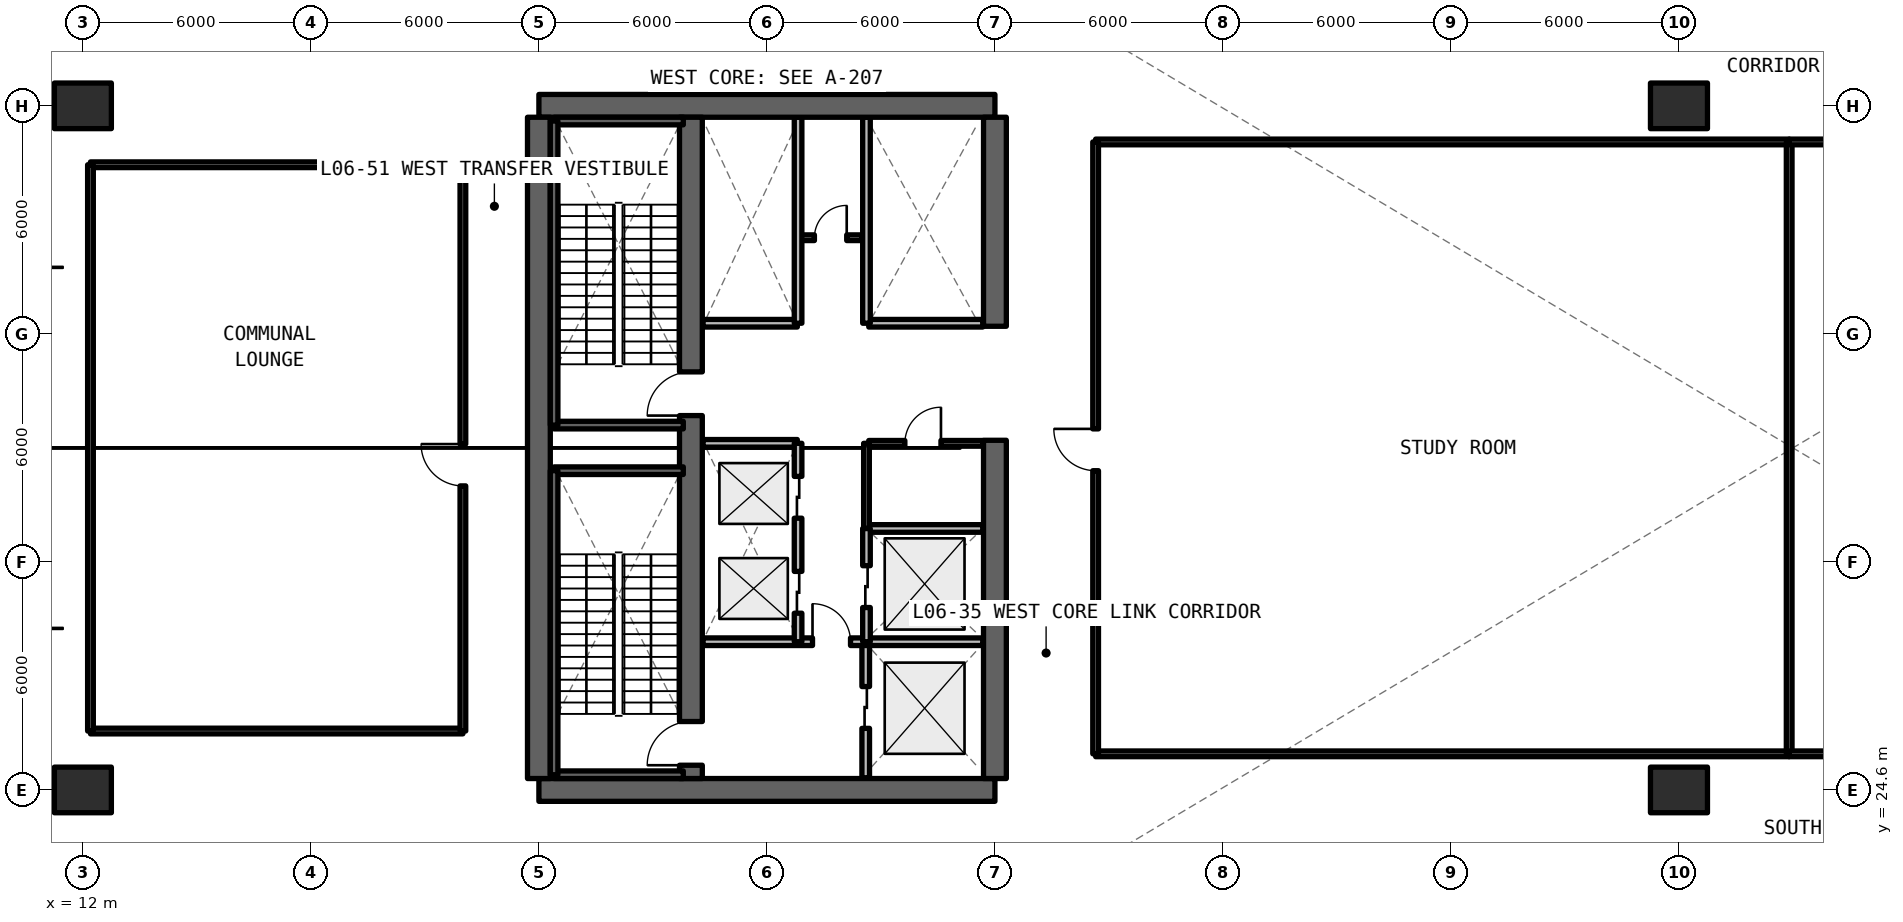
"""IFC4 building model, lengths in metres.
Left out: names, types, materials, properties, quantities, classifications, styles, units other than length and angle.
Written with IfcOpenShell. Run it as: python <this file> out.ifc"""

import sys

from ifc_helpers import new_model, si_unit, direction, frame, frame_2d, origin, origin_2d, place, context, subcontext, project, spatial, rectangle, extrude, element, fill, save


model = new_model("IFC4")
c1 = context("Model", 3, precision=1e-05, world=origin(), true_north=direction((0.0, 1.0)))
c2 = subcontext(c1, "Body", "Model", "MODEL_VIEW")
j1 = project(units=[si_unit("LENGTHUNIT", "METRE"), si_unit("PLANEANGLEUNIT", "RADIAN")], contexts=[c1])
p1 = place(None, origin())
s1 = spatial("IfcSite", under=j1, at=p1, CompositionType="ELEMENT")
p2 = place(p1, origin())
s2 = spatial("IfcBuilding", under=s1, at=p2, CompositionType="ELEMENT")
p3 = place(p2, frame((0.0, 0.0, 24.09)))
s3 = spatial("IfcBuildingStorey", under=s2, at=p3, CompositionType="ELEMENT", Elevation=24.09)
for number, where, z_axis, x_axis in (
    (1, (24.0, 24.6, 0.0), (0.0, 0.0, 1.0), (1.0, 0.0, 0.0)),
    (2, (36.0, 42.6, 0.0), (0.0, 0.0, 1.0), (-1.0, 0.0, 0.0)),
):
    element("IfcWall", number, at=place(p3, frame(where, z_axis=z_axis, x_axis=x_axis)), inside=s3, PredefinedType="SHEAR", context=c2, shape_type="SweptSolid", body=[
        extrude(rectangle(XDim=12.0, YDim=0.6, at=frame_2d((6.0, 0.0))), origin(), (0.0, 0.0, 1.0), 4.95),
    ])
p4 = place(p3, frame((24.0, 24.9, 0.0), z_axis=(0.0, 0.0, 1.0), x_axis=(0.0, 1.0, 0.0)))
e3 = element("IfcWall", 3, at=p4, inside=s3, PredefinedType="SHEAR", context=c2, shape_type="SweptSolid", body=[
    extrude(rectangle(XDim=17.4, YDim=0.6, at=frame_2d((8.7, 0.0))), origin(), (0.0, 0.0, 1.0), 4.95),
])
p5 = place(p3, frame((36.0, 24.9, 0.0), z_axis=(0.0, 0.0, 1.0), x_axis=(0.0, 1.0, 0.0)))
e4 = element("IfcWall", 4, at=p5, inside=s3, PredefinedType="SHEAR", context=c2, shape_type="SweptSolid", body=[
    extrude(rectangle(XDim=8.9, YDim=0.6, at=frame_2d((4.45, 0.0))), origin(), (0.0, 0.0, 1.0), 4.95),
])
p6 = place(p3, frame((36.0, 36.8, 0.0), z_axis=(0.0, 0.0, 1.0), x_axis=(0.0, 1.0, 0.0)))
e5 = element("IfcWall", 5, at=p6, inside=s3, PredefinedType="SHEAR", context=c2, shape_type="SweptSolid", body=[
    extrude(rectangle(XDim=5.5, YDim=0.6, at=frame_2d((2.75, 0.0))), origin(), (0.0, 0.0, 1.0), 4.95),
])
p7 = place(p3, frame((28.0, 24.9, 0.0), z_axis=(0.0, 0.0, 1.0), x_axis=(0.0, 1.0, 0.0)))
e6 = element("IfcWall", 6, at=p7, inside=s3, PredefinedType="SHEAR", context=c2, shape_type="SweptSolid", body=[
    extrude(rectangle(XDim=17.4, YDim=0.6, at=frame_2d((8.7, 0.0))), origin(), (0.0, 0.0, 1.0), 4.95),
])
p8 = place(p7, frame((0.35, 0.0, 0.0)))
e7 = element("IfcOpeningElement", 7, at=p8, cuts=e6, PredefinedType="OPENING", context=c2, shape_type="SweptSolid", body=[
    extrude(rectangle(XDim=1.15, YDim=2.15, at=frame_2d((0.575, 1.075))), frame((0.0, 0.31, 0.0), z_axis=(0.0, -1.0, 0.0), x_axis=(1.0, 0.0, 0.0)), (0.0, 0.0, 1.0), 0.62),
])
p9 = place(p7, frame((9.55, 0.0, 0.0)))
e8 = element("IfcOpeningElement", 8, at=p9, cuts=e6, PredefinedType="OPENING", context=c2, shape_type="SweptSolid", body=[
    extrude(rectangle(XDim=1.15, YDim=2.15, at=frame_2d((0.575, 1.075))), frame((0.0, 0.31, 0.0), z_axis=(0.0, -1.0, 0.0), x_axis=(1.0, 0.0, 0.0)), (0.0, 0.0, 1.0), 0.62),
])
for number, where, z_axis, x_axis in (
    (9, (12.0, 24.6, 0.0), (0.0, 0.0, 1.0), (1.0, 0.0, 0.0)),
    (10, (12.0, 42.6, 0.0), (0.0, 0.0, 1.0), (1.0, 0.0, 0.0)),
):
    element("IfcColumn", number, at=place(p3, frame(where, z_axis=z_axis, x_axis=x_axis)), inside=s3, PredefinedType="COLUMN", context=c2, shape_type="SweptSolid", body=[
        extrude(rectangle(XDim=1.5, YDim=1.2, at=origin_2d()), origin(), (0.0, 0.0, 1.0), 4.71),
    ])
for number, where, z_axis, x_axis in (
    (11, (54.0, 24.6, 0.0), (0.0, 0.0, 1.0), (1.0, 0.0, 0.0)),
    (12, (54.0, 42.6, 0.0), (0.0, 0.0, 1.0), (1.0, 0.0, 0.0)),
):
    element("IfcColumn", number, at=place(p3, frame(where, z_axis=z_axis, x_axis=x_axis)), inside=s3, PredefinedType="COLUMN", context=c2, shape_type="SweptSolid", body=[
        extrude(rectangle(XDim=1.5, YDim=1.2, at=origin_2d()), origin(), (0.0, 0.0, 1.0), 4.95),
    ])
p10 = place(p3, frame((32.6, 24.92, 0.0), z_axis=(0.0, 0.0, 1.0), x_axis=(0.0, 1.0, 0.0)))
e13 = element("IfcWall", 13, at=p10, inside=s3, PredefinedType="SOLIDWALL", context=c2, shape_type="SweptSolid", body=[
    extrude(rectangle(XDim=3.58, YDim=0.2, at=frame_2d((1.79, 0.0))), origin(), (0.0, 0.0, 1.0), 3.93),
])
p11 = place(p10, frame((1.3, 0.0, 0.0)))
e14 = element("IfcOpeningElement", 14, at=p11, cuts=e13, PredefinedType="OPENING", context=c2, shape_type="SweptSolid", body=[
    extrude(rectangle(XDim=1.1, YDim=2.2, at=frame_2d((0.55, 1.1))), frame((0.0, 0.11, 0.0), z_axis=(0.0, -1.0, 0.0), x_axis=(1.0, 0.0, 0.0)), (0.0, 0.0, 1.0), 0.22),
])
p12 = place(p3, frame((28.32, 28.5, 0.0), z_axis=(0.0, 0.0, 1.0), x_axis=(1.0, 0.0, 0.0)))
e15 = element("IfcWall", 15, at=p12, inside=s3, PredefinedType="SOLIDWALL", context=c2, shape_type="SweptSolid", body=[
    extrude(rectangle(XDim=7.36, YDim=0.2, at=frame_2d((3.68, 0.0))), origin(), (0.0, 0.0, 1.0), 3.93),
])
p13 = place(p12, frame((2.88, 0.0, 0.0)))
e16 = element("IfcOpeningElement", 16, at=p13, cuts=e15, PredefinedType="OPENING", context=c2, shape_type="SweptSolid", body=[
    extrude(rectangle(XDim=1.0, YDim=2.15, at=frame_2d((0.5, 1.075))), frame((0.0, 0.11, 0.0), z_axis=(0.0, -1.0, 0.0), x_axis=(1.0, 0.0, 0.0)), (0.0, 0.0, 1.0), 0.22),
])
p14 = place(p3, frame((30.9, 39.13, 0.0), z_axis=(0.0, 0.0, 1.0), x_axis=(1.0, 0.0, 0.0)))
e17 = element("IfcWall", 17, at=p14, inside=s3, PredefinedType="SOLIDWALL", context=c2, shape_type="SweptSolid", body=[
    extrude(rectangle(XDim=1.6, YDim=0.15, at=frame_2d((0.8, 0.0))), origin(), (0.0, 0.0, 1.0), 3.93),
])
p15 = place(p14, frame((0.35, 0.0, 0.0)))
e18 = element("IfcOpeningElement", 18, at=p15, cuts=e17, PredefinedType="OPENING", context=c2, shape_type="SweptSolid", body=[
    extrude(rectangle(XDim=0.85, YDim=2.1, at=frame_2d((0.425, 1.05))), frame((0.0, 0.085, 0.0), z_axis=(0.0, -1.0, 0.0), x_axis=(1.0, 0.0, 0.0)), (0.0, 0.0, 1.0), 0.17),
])
p16 = place(p3, frame((28.32, 33.72, 0.0), z_axis=(0.0, 0.0, 1.0), x_axis=(1.0, 0.0, 0.0)))
e19 = element("IfcWall", 19, at=p16, inside=s3, PredefinedType="SOLIDWALL", context=c2, shape_type="SweptSolid", body=[
    extrude(rectangle(XDim=2.48, YDim=0.2, at=frame_2d((1.24, 0.0))), origin(), (0.0, 0.0, 1.0), 3.93),
])
p17 = place(p3, frame((30.82, 28.5, 0.0), z_axis=(0.0, 0.0, 1.0), x_axis=(0.0, 1.0, 0.0)))
e20 = element("IfcWall", 20, at=p17, inside=s3, PredefinedType="SOLIDWALL", context=c2, shape_type="SweptSolid", body=[
    extrude(rectangle(XDim=5.22, YDim=0.2, at=frame_2d((2.61, 0.0))), origin(), (0.0, 0.0, 1.0), 3.93),
])
p18 = place(p17, frame((0.75, 0.0, 0.0)))
e21 = element("IfcOpeningElement", 21, at=p18, cuts=e20, PredefinedType="OPENING", context=c2, shape_type="SweptSolid", body=[
    extrude(rectangle(XDim=1.1, YDim=2.2, at=frame_2d((0.55, 1.1))), frame((0.0, 0.11, 0.0), z_axis=(0.0, -1.0, 0.0), x_axis=(1.0, 0.0, 0.0)), (0.0, 0.0, 1.0), 0.22),
])
p19 = place(p17, frame((3.25, 0.0, 0.0)))
e22 = element("IfcOpeningElement", 22, at=p19, cuts=e20, PredefinedType="OPENING", context=c2, shape_type="SweptSolid", body=[
    extrude(rectangle(XDim=1.1, YDim=2.2, at=frame_2d((0.55, 1.1))), frame((0.0, 0.11, 0.0), z_axis=(0.0, -1.0, 0.0), x_axis=(1.0, 0.0, 0.0)), (0.0, 0.0, 1.0), 0.22),
])
p20 = place(p3, frame((32.68, 31.48, 0.0), z_axis=(0.0, 0.0, 1.0), x_axis=(1.0, 0.0, 0.0)))
e23 = element("IfcWall", 23, at=p20, inside=s3, PredefinedType="SOLIDWALL", context=c2, shape_type="SweptSolid", body=[
    extrude(rectangle(XDim=3.0, YDim=0.2, at=frame_2d((1.5, 0.0))), origin(), (0.0, 0.0, 1.0), 3.93),
])
p21 = place(p3, frame((32.62, 28.5, 0.0), z_axis=(0.0, 0.0, 1.0), x_axis=(0.0, 1.0, 0.0)))
e24 = element("IfcWall", 24, at=p21, inside=s3, PredefinedType="SOLIDWALL", context=c2, shape_type="SweptSolid", body=[
    extrude(rectangle(XDim=2.98, YDim=0.2, at=frame_2d((1.49, 0.0))), origin(), (0.0, 0.0, 1.0), 3.93),
])
p22 = place(p21, frame((0.9, 0.0, 0.0)))
e25 = element("IfcOpeningElement", 25, at=p22, cuts=e24, PredefinedType="OPENING", context=c2, shape_type="SweptSolid", body=[
    extrude(rectangle(XDim=1.1, YDim=2.2, at=frame_2d((0.55, 1.1))), frame((0.0, 0.11, 0.0), z_axis=(0.0, -1.0, 0.0), x_axis=(1.0, 0.0, 0.0)), (0.0, 0.0, 1.0), 0.22),
])
p23 = place(p3, frame((32.62, 31.48, 0.0), z_axis=(0.0, 0.0, 1.0), x_axis=(0.0, 1.0, 0.0)))
e26 = element("IfcWall", 26, at=p23, inside=s3, PredefinedType="SOLIDWALL", context=c2, shape_type="SweptSolid", body=[
    extrude(rectangle(XDim=2.24, YDim=0.15, at=frame_2d((1.12, 0.0))), origin(), (0.0, 0.0, 1.0), 3.93),
])
p24 = place(p3, frame((32.68, 33.72, 0.0), z_axis=(0.0, 0.0, 1.0), x_axis=(1.0, 0.0, 0.0)))
e27 = element("IfcWall", 27, at=p24, inside=s3, PredefinedType="SOLIDWALL", context=c2, shape_type="SweptSolid", body=[
    extrude(rectangle(XDim=3.0, YDim=0.15, at=frame_2d((1.5, 0.0))), origin(), (0.0, 0.0, 1.0), 3.93),
])
p25 = place(p24, frame((0.95, 0.0, 0.0)))
e28 = element("IfcOpeningElement", 28, at=p25, cuts=e27, PredefinedType="OPENING", context=c2, shape_type="SweptSolid", body=[
    extrude(rectangle(XDim=0.95, YDim=2.15, at=frame_2d((0.475, 1.075))), frame((0.0, 0.085, 0.0), z_axis=(0.0, -1.0, 0.0), x_axis=(1.0, 0.0, 0.0)), (0.0, 0.0, 1.0), 0.17),
])
p26 = place(p3, frame((28.32, 36.88, 0.0), z_axis=(0.0, 0.0, 1.0), x_axis=(1.0, 0.0, 0.0)))
e29 = element("IfcWall", 29, at=p26, inside=s3, PredefinedType="SOLIDWALL", context=c2, shape_type="SweptSolid", body=[
    extrude(rectangle(XDim=2.48, YDim=0.2, at=frame_2d((1.24, 0.0))), origin(), (0.0, 0.0, 1.0), 3.93),
])
p27 = place(p3, frame((30.82, 36.88, 0.0), z_axis=(0.0, 0.0, 1.0), x_axis=(0.0, 1.0, 0.0)))
e30 = element("IfcWall", 30, at=p27, inside=s3, PredefinedType="SOLIDWALL", context=c2, shape_type="SweptSolid", body=[
    extrude(rectangle(XDim=5.42, YDim=0.2, at=frame_2d((2.71, 0.0))), origin(), (0.0, 0.0, 1.0), 3.93),
])
p28 = place(p3, frame((32.68, 36.88, 0.0), z_axis=(0.0, 0.0, 1.0), x_axis=(1.0, 0.0, 0.0)))
e31 = element("IfcWall", 31, at=p28, inside=s3, PredefinedType="SOLIDWALL", context=c2, shape_type="SweptSolid", body=[
    extrude(rectangle(XDim=3.0, YDim=0.2, at=frame_2d((1.5, 0.0))), origin(), (0.0, 0.0, 1.0), 3.93),
])
p29 = place(p3, frame((32.62, 36.88, 0.0), z_axis=(0.0, 0.0, 1.0), x_axis=(0.0, 1.0, 0.0)))
e32 = element("IfcWall", 32, at=p29, inside=s3, PredefinedType="SOLIDWALL", context=c2, shape_type="SweptSolid", body=[
    extrude(rectangle(XDim=5.42, YDim=0.2, at=frame_2d((2.71, 0.0))), origin(), (0.0, 0.0, 1.0), 3.93),
])
for number, where, z_axis, x_axis in (
    (33, (38.65, 25.55, 0.0), (0.0, 0.0, 1.0), (1.0, 0.0, 0.0)),
    (34, (38.65, 41.65, 0.0), (0.0, 0.0, 1.0), (1.0, 0.0, 0.0)),
):
    element("IfcWall", number, at=place(p3, frame(where, z_axis=z_axis, x_axis=x_axis)), inside=s3, PredefinedType="SOLIDWALL", context=c2, shape_type="SweptSolid", body=[
        extrude(rectangle(XDim=18.25, YDim=0.15, at=frame_2d((9.125, 0.0))), origin(), (0.0, 0.0, 1.0), 3.93),
    ])
p30 = place(p3, frame((38.65, 25.55, 0.0), z_axis=(0.0, 0.0, 1.0), x_axis=(0.0, 1.0, 0.0)))
e35 = element("IfcWall", 35, at=p30, inside=s3, PredefinedType="SOLIDWALL", context=c2, shape_type="SweptSolid", body=[
    extrude(rectangle(XDim=16.1, YDim=0.15, at=frame_2d((8.05, 0.0))), origin(), (0.0, 0.0, 1.0), 3.93),
])
p31 = place(p30, frame((7.45, 0.0, 0.0)))
e36 = element("IfcOpeningElement", 36, at=p31, cuts=e35, PredefinedType="OPENING", context=c2, shape_type="SweptSolid", body=[
    extrude(rectangle(XDim=1.1, YDim=2.15, at=frame_2d((0.55, 1.075))), frame((0.0, 0.085, 0.0), z_axis=(0.0, -1.0, 0.0), x_axis=(1.0, 0.0, 0.0)), (0.0, 0.0, 1.0), 0.17),
])
p32 = place(p3, frame((56.9, 25.55, 0.0), z_axis=(0.0, 0.0, 1.0), x_axis=(0.0, 1.0, 0.0)))
e37 = element("IfcWall", 37, at=p32, inside=s3, PredefinedType="SOLIDWALL", context=c2, shape_type="SweptSolid", body=[
    extrude(rectangle(XDim=16.1, YDim=0.15, at=frame_2d((8.05, 0.0))), origin(), (0.0, 0.0, 1.0), 3.93),
])
for number, where, z_axis, x_axis in (
    (38, (56.9, 25.55, 0.0), (0.0, 0.0, 1.0), (1.0, 0.0, 0.0)),
    (39, (56.9, 41.65, 0.0), (0.0, 0.0, 1.0), (1.0, 0.0, 0.0)),
):
    element("IfcWall", number, at=place(p3, frame(where, z_axis=z_axis, x_axis=x_axis)), inside=s3, PredefinedType="SOLIDWALL", context=c2, shape_type="SweptSolid", body=[
        extrude(rectangle(XDim=18.45, YDim=0.15, at=frame_2d((9.225, 0.0))), origin(), (0.0, 0.0, 1.0), 3.93),
    ])
for number, where, z_axis, x_axis in (
    (40, (12.2, 26.15, 0.0), (0.0, 0.0, 1.0), (1.0, 0.0, 0.0)),
    (41, (12.2, 41.05, 0.0), (0.0, 0.0, 1.0), (1.0, 0.0, 0.0)),
):
    element("IfcWall", number, at=place(p3, frame(where, z_axis=z_axis, x_axis=x_axis)), inside=s3, PredefinedType="SOLIDWALL", context=c2, shape_type="SweptSolid", body=[
        extrude(rectangle(XDim=9.8, YDim=0.15, at=frame_2d((4.9, 0.0))), origin(), (0.0, 0.0, 1.0), 3.93),
    ])
p33 = place(p3, frame((12.2, 26.15, 0.0), z_axis=(0.0, 0.0, 1.0), x_axis=(0.0, 1.0, 0.0)))
e42 = element("IfcWall", 42, at=p33, inside=s3, PredefinedType="SOLIDWALL", context=c2, shape_type="SweptSolid", body=[
    extrude(rectangle(XDim=14.9, YDim=0.15, at=frame_2d((7.45, 0.0))), origin(), (0.0, 0.0, 1.0), 3.93),
])
p34 = place(p3, frame((22.0, 26.15, 0.0), z_axis=(0.0, 0.0, 1.0), x_axis=(0.0, 1.0, 0.0)))
e43 = element("IfcWall", 43, at=p34, inside=s3, PredefinedType="SOLIDWALL", context=c2, shape_type="SweptSolid", body=[
    extrude(rectangle(XDim=14.9, YDim=0.15, at=frame_2d((7.45, 0.0))), origin(), (0.0, 0.0, 1.0), 3.93),
])
p35 = place(p34, frame((6.45, 0.0, 0.0)))
e44 = element("IfcOpeningElement", 44, at=p35, cuts=e43, PredefinedType="OPENING", context=c2, shape_type="SweptSolid", body=[
    extrude(rectangle(XDim=1.1, YDim=2.15, at=frame_2d((0.55, 1.075))), frame((0.0, 0.085, 0.0), z_axis=(0.0, -1.0, 0.0), x_axis=(1.0, 0.0, 0.0)), (0.0, 0.0, 1.0), 0.17),
])
for number, where, z_axis, x_axis in (
    (45, (24.4, 25.0, 0.0), (0.0, 0.0, 1.0), (1.0, 0.0, 0.0)),
    (46, (27.8, 33.0, 0.0), (0.0, 0.0, 1.0), (-1.0, 0.0, 0.0)),
):
    element("IfcWall", number, at=place(p3, frame(where, z_axis=z_axis, x_axis=x_axis)), inside=s3, PredefinedType="SOLIDWALL", context=c2, shape_type="SweptSolid", body=[
        extrude(rectangle(XDim=3.4, YDim=0.2, at=frame_2d((1.7, 0.0))), origin(), (0.0, 0.0, 1.0), 4.95),
    ])
p36 = place(p3, frame((24.4, 33.0, 0.0), z_axis=(0.0, 0.0, 1.0), x_axis=(0.0, -1.0, 0.0)))
e47 = element("IfcWall", 47, at=p36, inside=s3, PredefinedType="SOLIDWALL", context=c2, shape_type="SweptSolid", body=[
    extrude(rectangle(XDim=8.0, YDim=0.2, at=frame_2d((4.0, 0.0))), origin(), (0.0, 0.0, 1.0), 4.95),
])
for number, where, z_axis, x_axis in (
    (48, (24.4, 34.2, 0.0), (0.0, 0.0, 1.0), (1.0, 0.0, 0.0)),
    (49, (27.8, 42.2, 0.0), (0.0, 0.0, 1.0), (-1.0, 0.0, 0.0)),
):
    element("IfcWall", number, at=place(p3, frame(where, z_axis=z_axis, x_axis=x_axis)), inside=s3, PredefinedType="SOLIDWALL", context=c2, shape_type="SweptSolid", body=[
        extrude(rectangle(XDim=3.4, YDim=0.2, at=frame_2d((1.7, 0.0))), origin(), (0.0, 0.0, 1.0), 4.95),
    ])
p37 = place(p3, frame((24.4, 42.2, 0.0), z_axis=(0.0, 0.0, 1.0), x_axis=(0.0, -1.0, 0.0)))
e50 = element("IfcWall", 50, at=p37, inside=s3, PredefinedType="SOLIDWALL", context=c2, shape_type="SweptSolid", body=[
    extrude(rectangle(XDim=8.0, YDim=0.2, at=frame_2d((4.0, 0.0))), origin(), (0.0, 0.0, 1.0), 4.95),
])
p38 = place(p11, origin())
e51 = element("IfcDoor", 51, at=p38, inside=s3, OperationType="SLIDING_TO_LEFT", PredefinedType="DOOR", context=c2, shape_type="SweptSolid", body=[
    extrude(rectangle(XDim=1.1, YDim=2.2, at=frame_2d((0.55, 1.1))), frame((0.0, 0.025, 0.0), z_axis=(0.0, -1.0, 0.0), x_axis=(1.0, 0.0, 0.0)), (0.0, 0.0, 1.0), 0.05),
])
fill(e14, e51)
p39 = place(p13, origin())
e52 = element("IfcDoor", 52, at=p39, inside=s3, OperationType="SINGLE_SWING_LEFT", PredefinedType="DOOR", context=c2, shape_type="SweptSolid", body=[
    extrude(rectangle(XDim=1.0, YDim=2.15, at=frame_2d((0.5, 1.075))), frame((0.0, 0.025, 0.0), z_axis=(0.0, -1.0, 0.0), x_axis=(1.0, 0.0, 0.0)), (0.0, 0.0, 1.0), 0.05),
])
fill(e16, e52)
p40 = place(p15, origin())
e53 = element("IfcDoor", 53, at=p40, inside=s3, OperationType="SINGLE_SWING_RIGHT", PredefinedType="DOOR", context=c2, shape_type="SweptSolid", body=[
    extrude(rectangle(XDim=0.85, YDim=2.1, at=frame_2d((0.425, 1.05))), frame((0.0, 0.025, 0.0), z_axis=(0.0, -1.0, 0.0), x_axis=(1.0, 0.0, 0.0)), (0.0, 0.0, 1.0), 0.05),
])
fill(e18, e53)
p41 = place(p18, origin())
e54 = element("IfcDoor", 54, at=p41, inside=s3, OperationType="SLIDING_TO_LEFT", PredefinedType="DOOR", context=c2, shape_type="SweptSolid", body=[
    extrude(rectangle(XDim=1.1, YDim=2.2, at=frame_2d((0.55, 1.1))), frame((0.0, 0.025, 0.0), z_axis=(0.0, -1.0, 0.0), x_axis=(1.0, 0.0, 0.0)), (0.0, 0.0, 1.0), 0.05),
])
fill(e21, e54)
p42 = place(p19, origin())
e55 = element("IfcDoor", 55, at=p42, inside=s3, OperationType="SLIDING_TO_RIGHT", PredefinedType="DOOR", context=c2, shape_type="SweptSolid", body=[
    extrude(rectangle(XDim=1.1, YDim=2.2, at=frame_2d((0.55, 1.1))), frame((0.0, 0.025, 0.0), z_axis=(0.0, -1.0, 0.0), x_axis=(1.0, 0.0, 0.0)), (0.0, 0.0, 1.0), 0.05),
])
fill(e22, e55)
p43 = place(p22, origin())
e56 = element("IfcDoor", 56, at=p43, inside=s3, OperationType="SLIDING_TO_LEFT", PredefinedType="DOOR", context=c2, shape_type="SweptSolid", body=[
    extrude(rectangle(XDim=1.1, YDim=2.2, at=frame_2d((0.55, 1.1))), frame((0.0, 0.025, 0.0), z_axis=(0.0, -1.0, 0.0), x_axis=(1.0, 0.0, 0.0)), (0.0, 0.0, 1.0), 0.05),
])
fill(e25, e56)
p44 = place(p25, origin())
e57 = element("IfcDoor", 57, at=p44, inside=s3, OperationType="SINGLE_SWING_RIGHT", PredefinedType="DOOR", context=c2, shape_type="SweptSolid", body=[
    extrude(rectangle(XDim=0.95, YDim=2.15, at=frame_2d((0.475, 1.075))), frame((0.0, 0.025, 0.0), z_axis=(0.0, -1.0, 0.0), x_axis=(1.0, 0.0, 0.0)), (0.0, 0.0, 1.0), 0.05),
])
fill(e28, e57)
p45 = place(p31, origin())
e58 = element("IfcDoor", 58, at=p45, inside=s3, OperationType="SINGLE_SWING_RIGHT", PredefinedType="DOOR", context=c2, shape_type="SweptSolid", body=[
    extrude(rectangle(XDim=1.1, YDim=2.15, at=frame_2d((0.55, 1.075))), frame((0.0, 0.025, 0.0), z_axis=(0.0, -1.0, 0.0), x_axis=(1.0, 0.0, 0.0)), (0.0, 0.0, 1.0), 0.05),
])
fill(e36, e58)
p46 = place(p35, origin())
e59 = element("IfcDoor", 59, at=p46, inside=s3, OperationType="SINGLE_SWING_RIGHT", PredefinedType="DOOR", context=c2, shape_type="SweptSolid", body=[
    extrude(rectangle(XDim=1.1, YDim=2.15, at=frame_2d((0.55, 1.075))), frame((0.0, 0.025, 0.0), z_axis=(0.0, -1.0, 0.0), x_axis=(1.0, 0.0, 0.0)), (0.0, 0.0, 1.0), 0.05),
])
fill(e44, e59)
p47 = place(p8, origin())
e60 = element("IfcDoor", 60, at=p47, inside=s3, OperationType="SINGLE_SWING_RIGHT", PredefinedType="DOOR", context=c2, shape_type="SweptSolid", body=[
    extrude(rectangle(XDim=1.15, YDim=2.15, at=frame_2d((0.575, 1.075))), frame((0.0, 0.025, 0.0), z_axis=(0.0, -1.0, 0.0), x_axis=(1.0, 0.0, 0.0)), (0.0, 0.0, 1.0), 0.05),
])
fill(e7, e60)
p48 = place(p9, origin())
e61 = element("IfcDoor", 61, at=p48, inside=s3, OperationType="SINGLE_SWING_LEFT", PredefinedType="DOOR", context=c2, shape_type="SweptSolid", body=[
    extrude(rectangle(XDim=1.15, YDim=2.15, at=frame_2d((0.575, 1.075))), frame((0.0, 0.025, 0.0), z_axis=(0.0, -1.0, 0.0), x_axis=(1.0, 0.0, 0.0)), (0.0, 0.0, 1.0), 0.05),
])
fill(e8, e61)
save(model, sys.argv[1])
